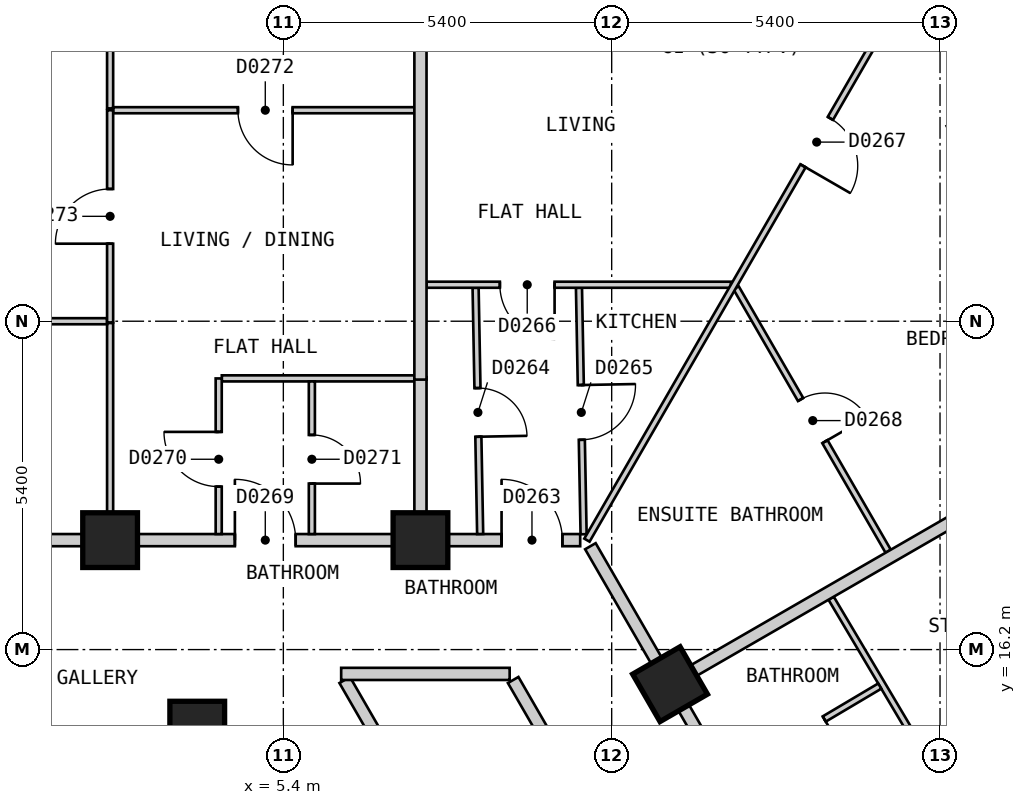
"""IFC4 building model, lengths in metres.
Left out: names, types, materials, properties, quantities, classifications, styles, units other than length and angle.
Written with IfcOpenShell. Run it as: python <this file> out.ifc"""

import sys

from ifc_helpers import new_model, si_unit, direction, frame, frame_2d, origin, origin_2d, place, context, subcontext, project, spatial, polyline, rectangle, outline, extrude, element, fill, save


model = new_model("IFC4")
c1 = context("Model", 3, precision=1e-05, world=origin(), true_north=direction((0.0, 1.0)))
c2 = subcontext(c1, "Body", "Model", "MODEL_VIEW")
j1 = project(units=[si_unit("LENGTHUNIT", "METRE"), si_unit("PLANEANGLEUNIT", "RADIAN")], contexts=[c1])
p1 = place(None, origin())
s1 = spatial("IfcSite", under=j1, at=p1, CompositionType="ELEMENT")
p2 = place(p1, origin())
s2 = spatial("IfcBuilding", under=s1, at=p2, CompositionType="ELEMENT")
p3 = place(p2, frame((0.0, 0.0, 47.4)))
s3 = spatial("IfcBuildingStorey", under=s2, at=p3, CompositionType="ELEMENT", Elevation=47.4)
for number, where, z_axis, x_axis in (
    (1, (11.76, 15.631, 0.0), (0.0, 0.0, 1.0), (-0.5, 0.866, 0.0)),
    (2, (7.655, 18.0, 0.0), (0.0, 0.0, 1.0), (-1.0, 0.0, 0.0)),
    (3, (3.984, 14.9, 0.0), (0.0, 0.0, 1.0), (1.0, 0.0, 0.0)),
    (4, (2.551, 18.0, 0.0), (0.0, 0.0, 1.0), (-1.0, 0.0, 0.0)),
):
    element("IfcColumn", number, at=place(p3, frame(where, z_axis=z_axis, x_axis=x_axis)), inside=s3, PredefinedType="COLUMN", context=c2, shape_type="SweptSolid", body=[
        extrude(rectangle(XDim=0.9, YDim=0.9, at=origin_2d()), origin(), (0.0, 0.0, 1.0), 3.0),
    ])
p4 = place(p3, frame((17.765, 25.77, 0.0), z_axis=(0.0, 0.0, 1.0), x_axis=(-0.866010750942, 0.50002537861, 0.0)))
e5 = element("IfcWall", 5, at=p4, inside=s3, PredefinedType="SOLIDWALL", context=c2, shape_type="SweptSolid", body=[
    extrude(outline(polyline([(0.0, -0.15), (5.0, -0.15), (4.919, 0.15), (0.08, 0.15), (0.0, -0.15)])), origin(), (0.0, 0.0, 1.0), 2.7),
])
p5 = place(p4, frame((0.65, 0.0, 0.15)))
e6 = element("IfcOpeningElement", 6, at=p5, cuts=e5, PredefinedType="OPENING", context=c2, shape_type="SweptSolid", body=[
    extrude(rectangle(XDim=1.2, YDim=2.1, at=frame_2d((0.6, 1.05))), frame((0.0, 0.16, 0.0), z_axis=(0.0, -1.0, 0.0), x_axis=(1.0, 0.0, 0.0)), (0.0, 0.0, 1.0), 0.32),
])
p6 = place(p4, frame((3.15, 0.0, 0.15)))
e7 = element("IfcOpeningElement", 7, at=p6, cuts=e5, PredefinedType="OPENING", context=c2, shape_type="SweptSolid", body=[
    extrude(rectangle(XDim=1.2, YDim=2.1, at=frame_2d((0.6, 1.05))), frame((0.0, 0.16, 0.0), z_axis=(0.0, -1.0, 0.0), x_axis=(1.0, 0.0, 0.0)), (0.0, 0.0, 1.0), 0.32),
])
p7 = place(p3, frame((6.409, 15.7, 0.0), z_axis=(0.0, 0.0, 1.0), x_axis=(0.499930377127, -0.866065596838, 0.0)))
e8 = element("IfcWall", 8, at=p7, inside=s3, PredefinedType="PARTITIONING", context=c2, shape_type="SweptSolid", body=[
    extrude(rectangle(XDim=8.775, YDim=0.2, at=frame_2d((4.388, 0.0))), origin(), (0.0, 0.0, 1.0), 2.7),
])
p8 = place(p3, frame((9.18, 15.7, 0.0), z_axis=(0.0, 0.0, 1.0), x_axis=(0.500003652032, -0.866023295272, 0.0)))
e9 = element("IfcWall", 9, at=p8, inside=s3, PredefinedType="PARTITIONING", context=c2, shape_type="SweptSolid", body=[
    extrude(rectangle(XDim=18.012, YDim=0.2, at=frame_2d((9.006, 0.0))), origin(), (0.0, 0.0, 1.0), 2.7),
])
p9 = place(p8, frame((8.556, 0.0, 0.0)))
e10 = element("IfcOpeningElement", 10, at=p9, cuts=e9, PredefinedType="OPENING", context=c2, shape_type="SweptSolid", body=[
    extrude(rectangle(XDim=0.9, YDim=2.1, at=frame_2d((0.45, 1.05))), frame((0.0, 0.11, 0.0), z_axis=(0.0, -1.0, 0.0), x_axis=(1.0, 0.0, 0.0)), (0.0, 0.0, 1.0), 0.22),
])
p10 = place(p3, frame((10.45, 17.9, 0.0), z_axis=(0.0, 0.0, 1.0), x_axis=(0.500034352617, -0.866005569383, 0.0)))
e11 = element("IfcWall", 11, at=p10, inside=s3, PredefinedType="PARTITIONING", context=c2, shape_type="SweptSolid", body=[
    extrude(rectangle(XDim=20.553, YDim=0.2, at=frame_2d((10.276, 0.0))), origin(), (0.0, 0.0, 1.0), 2.7),
])
p11 = place(p10, frame((14.879, 0.0, 0.0)))
e12 = element("IfcOpeningElement", 12, at=p11, cuts=e11, PredefinedType="OPENING", context=c2, shape_type="SweptSolid", body=[
    extrude(rectangle(XDim=1.0, YDim=2.1, at=frame_2d((0.5, 1.05))), frame((0.0, 0.11, 0.0), z_axis=(0.0, -1.0, 0.0), x_axis=(1.0, 0.0, 0.0)), (0.0, 0.0, 1.0), 0.22),
])
p12 = place(p10, frame((9.775, 0.0, 0.0)))
e13 = element("IfcOpeningElement", 13, at=p12, cuts=e11, PredefinedType="OPENING", context=c2, shape_type="SweptSolid", body=[
    extrude(rectangle(XDim=1.0, YDim=2.1, at=frame_2d((0.5, 1.05))), frame((0.0, 0.11, 0.0), z_axis=(0.0, -1.0, 0.0), x_axis=(1.0, 0.0, 0.0)), (0.0, 0.0, 1.0), 0.22),
])
p13 = place(p10, frame((4.671, 0.0, 0.0)))
e14 = element("IfcOpeningElement", 14, at=p13, cuts=e11, PredefinedType="OPENING", context=c2, shape_type="SweptSolid", body=[
    extrude(rectangle(XDim=1.0, YDim=2.1, at=frame_2d((0.5, 1.05))), frame((0.0, 0.11, 0.0), z_axis=(0.0, -1.0, 0.0), x_axis=(1.0, 0.0, 0.0)), (0.0, 0.0, 1.0), 0.22),
])
p14 = place(p3, frame((6.351, 15.8, 0.0), z_axis=(0.0, 0.0, 1.0), x_axis=(1.0, 0.0, 0.0)))
e15 = element("IfcWall", 15, at=p14, inside=s3, PredefinedType="PARTITIONING", context=c2, shape_type="SweptSolid", body=[
    extrude(rectangle(XDim=2.771, YDim=0.2, at=frame_2d((1.385, 0.0))), origin(), (0.0, 0.0, 1.0), 2.7),
])
p15 = place(p3, frame((-10.276, 18.0, 0.0), z_axis=(0.0, 0.0, 1.0), x_axis=(1.0, 0.0, 0.0)))
e16 = element("IfcWall", 16, at=p15, inside=s3, PredefinedType="PARTITIONING", context=c2, shape_type="SweptSolid", body=[
    extrude(rectangle(XDim=20.558, YDim=0.2, at=frame_2d((10.279, 0.0))), origin(), (0.0, 0.0, 1.0), 2.7),
])
p16 = place(p15, frame((19.265, 0.0, 0.0)))
e17 = element("IfcOpeningElement", 17, at=p16, cuts=e16, PredefinedType="OPENING", context=c2, shape_type="SweptSolid", body=[
    extrude(rectangle(XDim=1.0, YDim=2.1, at=frame_2d((0.5, 1.05))), frame((0.0, 0.11, 0.0), z_axis=(0.0, -1.0, 0.0), x_axis=(1.0, 0.0, 0.0)), (0.0, 0.0, 1.0), 0.22),
])
p17 = place(p15, frame((14.879, 0.0, 0.0)))
e18 = element("IfcOpeningElement", 18, at=p17, cuts=e16, PredefinedType="OPENING", context=c2, shape_type="SweptSolid", body=[
    extrude(rectangle(XDim=1.0, YDim=2.1, at=frame_2d((0.5, 1.05))), frame((0.0, 0.11, 0.0), z_axis=(0.0, -1.0, 0.0), x_axis=(1.0, 0.0, 0.0)), (0.0, 0.0, 1.0), 0.22),
])
p18 = place(p15, frame((4.671, 0.0, 0.0)))
e19 = element("IfcOpeningElement", 19, at=p18, cuts=e16, PredefinedType="OPENING", context=c2, shape_type="SweptSolid", body=[
    extrude(rectangle(XDim=1.0, YDim=2.1, at=frame_2d((0.5, 1.05))), frame((0.0, 0.11, 0.0), z_axis=(0.0, -1.0, 0.0), x_axis=(1.0, 0.0, 0.0)), (0.0, 0.0, 1.0), 0.22),
])
p19 = place(p3, frame((14.409, 17.045, 0.0), z_axis=(0.0, 0.0, 1.0), x_axis=(0.510362209222, -0.859959542884, 0.0)))
e20 = element("IfcWall", 20, at=p19, inside=s3, PredefinedType="PARTITIONING", context=c2, shape_type="SweptSolid", body=[
    extrude(rectangle(XDim=3.131, YDim=0.1, at=frame_2d((1.566, 0.0))), origin(), (0.0, 0.0, 1.0), 2.7),
])
p20 = place(p3, frame((12.846, 22.15, 0.0), z_axis=(0.0, 0.0, 1.0), x_axis=(0.500002715276, -0.866023836113, 0.0)))
e21 = element("IfcWall", 21, at=p20, inside=s3, PredefinedType="PARTITIONING", context=c2, shape_type="SweptSolid", body=[
    extrude(rectangle(XDim=5.002, YDim=0.1, at=frame_2d((2.501, 0.0))), origin(), (0.0, 0.0, 1.0), 2.7),
])
p21 = place(p20, frame((2.122, 0.0, 0.0)))
e22 = element("IfcOpeningElement", 22, at=p21, cuts=e21, PredefinedType="OPENING", context=c2, shape_type="SweptSolid", body=[
    extrude(rectangle(XDim=0.8, YDim=2.1, at=frame_2d((0.4, 1.05))), frame((0.0, 0.06, 0.0), z_axis=(0.0, -1.0, 0.0), x_axis=(1.0, 0.0, 0.0)), (0.0, 0.0, 1.0), 0.12),
])
p22 = place(p3, frame((8.562, 22.15, 0.0), z_axis=(0.0, 0.0, 1.0), x_axis=(0.018504185939, -0.999828782894, 0.0)))
e23 = element("IfcWall", 23, at=p22, inside=s3, PredefinedType="PARTITIONING", context=c2, shape_type="SweptSolid", body=[
    extrude(rectangle(XDim=4.051, YDim=0.1, at=frame_2d((2.025, 0.0))), origin(), (0.0, 0.0, 1.0), 2.7),
])
p23 = place(p22, frame((1.65, 0.0, 0.0)))
e24 = element("IfcOpeningElement", 24, at=p23, cuts=e23, PredefinedType="OPENING", context=c2, shape_type="SweptSolid", body=[
    extrude(rectangle(XDim=0.8, YDim=2.1, at=frame_2d((0.4, 1.05))), frame((0.0, 0.06, 0.0), z_axis=(0.0, -1.0, 0.0), x_axis=(1.0, 0.0, 0.0)), (0.0, 0.0, 1.0), 0.12),
])
p24 = place(p3, frame((10.262, 22.15, 0.0), z_axis=(0.0, 0.0, 1.0), x_axis=(0.018730524712, -0.999824568334, 0.0)))
e25 = element("IfcWall", 25, at=p24, inside=s3, PredefinedType="PARTITIONING", context=c2, shape_type="SweptSolid", body=[
    extrude(rectangle(XDim=4.054, YDim=0.1, at=frame_2d((2.027, 0.0))), origin(), (0.0, 0.0, 1.0), 2.7),
])
p25 = place(p24, frame((1.6, 0.0, 0.0)))
e26 = element("IfcOpeningElement", 26, at=p25, cuts=e25, PredefinedType="OPENING", context=c2, shape_type="SweptSolid", body=[
    extrude(rectangle(XDim=0.9, YDim=2.1, at=frame_2d((0.45, 1.05))), frame((0.0, 0.06, 0.0), z_axis=(0.0, -1.0, 0.0), x_axis=(1.0, 0.0, 0.0)), (0.0, 0.0, 1.0), 0.12),
])
p26 = place(p3, frame((2.551, 28.1, 0.0), z_axis=(0.0, 0.0, 1.0), x_axis=(0.0, -1.0, 0.0)))
e27 = element("IfcWall", 27, at=p26, inside=s3, PredefinedType="PARTITIONING", context=c2, shape_type="SweptSolid", body=[
    extrude(rectangle(XDim=3.0, YDim=0.1, at=frame_2d((1.5, 0.0))), origin(), (0.0, 0.0, 1.0), 2.7),
])
p27 = place(p3, frame((2.551, 21.57, 0.0), z_axis=(0.0, 0.0, 1.0), x_axis=(0.0, -1.0, 0.0)))
e28 = element("IfcWall", 28, at=p27, inside=s3, PredefinedType="PARTITIONING", context=c2, shape_type="SweptSolid", body=[
    extrude(rectangle(XDim=3.47, YDim=0.1, at=frame_2d((1.735, 0.0))), origin(), (0.0, 0.0, 1.0), 2.7),
])
p28 = place(p3, frame((4.388, 20.66, 0.0), z_axis=(0.0, 0.0, 1.0), x_axis=(1.0, 0.0, 0.0)))
e29 = element("IfcWall", 29, at=p28, inside=s3, PredefinedType="PARTITIONING", context=c2, shape_type="SweptSolid", body=[
    extrude(rectangle(XDim=3.167, YDim=0.1, at=frame_2d((1.583, 0.0))), origin(), (0.0, 0.0, 1.0), 2.7),
])
p29 = place(p3, frame((-2.453, 21.6, 0.0), z_axis=(0.0, 0.0, 1.0), x_axis=(1.0, 0.0, 0.0)))
e30 = element("IfcWall", 30, at=p29, inside=s3, PredefinedType="PARTITIONING", context=c2, shape_type="SweptSolid", body=[
    extrude(rectangle(XDim=4.954, YDim=0.1, at=frame_2d((2.477, 0.0))), origin(), (0.0, 0.0, 1.0), 2.7),
])
p30 = place(p29, frame((2.052, 0.0, 0.0)))
e31 = element("IfcOpeningElement", 31, at=p30, cuts=e30, PredefinedType="OPENING", context=c2, shape_type="SweptSolid", body=[
    extrude(rectangle(XDim=0.8, YDim=2.1, at=frame_2d((0.4, 1.05))), frame((0.0, 0.06, 0.0), z_axis=(0.0, -1.0, 0.0), x_axis=(1.0, 0.0, 0.0)), (0.0, 0.0, 1.0), 0.12),
])
p31 = place(p3, frame((7.755, 22.2, 0.0), z_axis=(0.0, 0.0, 1.0), x_axis=(1.0, 0.0, 0.0)))
e32 = element("IfcWall", 32, at=p31, inside=s3, PredefinedType="PARTITIONING", context=c2, shape_type="SweptSolid", body=[
    extrude(rectangle(XDim=5.005, YDim=0.1, at=frame_2d((2.502, 0.0))), origin(), (0.0, 0.0, 1.0), 2.7),
])
p32 = place(p31, frame((1.206, 0.0, 0.0)))
e33 = element("IfcOpeningElement", 33, at=p32, cuts=e32, PredefinedType="OPENING", context=c2, shape_type="SweptSolid", body=[
    extrude(rectangle(XDim=0.9, YDim=2.1, at=frame_2d((0.45, 1.05))), frame((0.0, 0.06, 0.0), z_axis=(0.0, -1.0, 0.0), x_axis=(1.0, 0.0, 0.0)), (0.0, 0.0, 1.0), 0.12),
])
p33 = place(p3, frame((2.601, 25.07, 0.0), z_axis=(0.0, 0.0, 1.0), x_axis=(1.0, 0.0, 0.0)))
e34 = element("IfcWall", 34, at=p33, inside=s3, PredefinedType="PARTITIONING", context=c2, shape_type="SweptSolid", body=[
    extrude(rectangle(XDim=4.954, YDim=0.1, at=frame_2d((2.477, 0.0))), origin(), (0.0, 0.0, 1.0), 2.7),
])
p34 = place(p33, frame((2.052, 0.0, 0.0)))
e35 = element("IfcOpeningElement", 35, at=p34, cuts=e34, PredefinedType="OPENING", context=c2, shape_type="SweptSolid", body=[
    extrude(rectangle(XDim=0.9, YDim=2.1, at=frame_2d((0.45, 1.05))), frame((0.0, 0.06, 0.0), z_axis=(0.0, -1.0, 0.0), x_axis=(1.0, 0.0, 0.0)), (0.0, 0.0, 1.0), 0.12),
])
p35 = place(p3, frame((10.393, 18.0, 0.0), z_axis=(0.0, 0.0, 1.0), x_axis=(0.499945497007, 0.866056868816, 0.0)))
e36 = element("IfcWall", 36, at=p35, inside=s3, PredefinedType="PARTITIONING", context=c2, shape_type="SweptSolid", body=[
    extrude(rectangle(XDim=10.265, YDim=0.1, at=frame_2d((5.132, 0.0))), origin(), (0.0, 0.0, 1.0), 2.7),
])
p36 = place(p35, frame((7.108, 0.0, 0.0)))
e37 = element("IfcOpeningElement", 37, at=p36, cuts=e36, PredefinedType="OPENING", context=c2, shape_type="SweptSolid", body=[
    extrude(rectangle(XDim=0.9, YDim=2.1, at=frame_2d((0.45, 1.05))), frame((0.0, 0.06, 0.0), z_axis=(0.0, -1.0, 0.0), x_axis=(1.0, 0.0, 0.0)), (0.0, 0.0, 1.0), 0.12),
])
p37 = place(p3, frame((4.337, 18.1, 0.0), z_axis=(0.0, 0.0, 1.0), x_axis=(0.0, 1.0, 0.0)))
e38 = element("IfcWall", 38, at=p37, inside=s3, PredefinedType="PARTITIONING", context=c2, shape_type="SweptSolid", body=[
    extrude(rectangle(XDim=2.559, YDim=0.1, at=frame_2d((1.279, 0.0))), origin(), (0.0, 0.0, 1.0), 2.7),
])
p38 = place(p37, frame((0.78, 0.0, 0.0)))
e39 = element("IfcOpeningElement", 39, at=p38, cuts=e38, PredefinedType="OPENING", context=c2, shape_type="SweptSolid", body=[
    extrude(rectangle(XDim=0.9, YDim=2.1, at=frame_2d((0.45, 1.05))), frame((0.0, 0.06, 0.0), z_axis=(0.0, -1.0, 0.0), x_axis=(1.0, 0.0, 0.0)), (0.0, 0.0, 1.0), 0.12),
])
p39 = place(p3, frame((5.869, 18.1, 0.0), z_axis=(0.0, 0.0, 1.0), x_axis=(0.0, 1.0, 0.0)))
e40 = element("IfcWall", 40, at=p39, inside=s3, PredefinedType="PARTITIONING", context=c2, shape_type="SweptSolid", body=[
    extrude(rectangle(XDim=2.51, YDim=0.1, at=frame_2d((1.255, 0.0))), origin(), (0.0, 0.0, 1.0), 2.7),
])
p40 = place(p39, frame((0.83, 0.0, 0.0)))
e41 = element("IfcOpeningElement", 41, at=p40, cuts=e40, PredefinedType="OPENING", context=c2, shape_type="SweptSolid", body=[
    extrude(rectangle(XDim=0.8, YDim=2.1, at=frame_2d((0.4, 1.05))), frame((0.0, 0.06, 0.0), z_axis=(0.0, -1.0, 0.0), x_axis=(1.0, 0.0, 0.0)), (0.0, 0.0, 1.0), 0.12),
])
p41 = place(p3, frame((2.551, 21.58, 0.0), z_axis=(0.0, 0.0, 1.0), x_axis=(0.0, 1.0, 0.0)))
e42 = element("IfcWall", 42, at=p41, inside=s3, PredefinedType="PARTITIONING", context=c2, shape_type="SweptSolid", body=[
    extrude(rectangle(XDim=3.49, YDim=0.1, at=frame_2d((1.745, 0.0))), origin(), (0.0, 0.0, 1.0), 2.7),
])
p42 = place(p41, frame((1.295, 0.0, 0.0)))
e43 = element("IfcOpeningElement", 43, at=p42, cuts=e42, PredefinedType="OPENING", context=c2, shape_type="SweptSolid", body=[
    extrude(rectangle(XDim=0.9, YDim=2.1, at=frame_2d((0.45, 1.05))), frame((0.0, 0.06, 0.0), z_axis=(0.0, -1.0, 0.0), x_axis=(1.0, 0.0, 0.0)), (0.0, 0.0, 1.0), 0.12),
])
p43 = place(p3, frame((12.739, 14.135, 0.0), z_axis=(0.0, 0.0, 1.0), x_axis=(0.860077414703, 0.510163543109, 0.0)))
e44 = element("IfcWall", 44, at=p43, inside=s3, PredefinedType="PARTITIONING", context=c2, shape_type="SweptSolid", body=[
    extrude(rectangle(XDim=2.872, YDim=0.1, at=frame_2d((1.436, 0.0))), origin(), (0.0, 0.0, 1.0), 2.7),
])
p44 = place(p43, frame((1.01, 0.0, 0.0)))
e45 = element("IfcOpeningElement", 45, at=p44, cuts=e44, PredefinedType="OPENING", context=c2, shape_type="SweptSolid", body=[
    extrude(rectangle(XDim=0.8, YDim=2.1, at=frame_2d((0.4, 1.05))), frame((0.0, 0.06, 0.0), z_axis=(0.0, -1.0, 0.0), x_axis=(1.0, 0.0, 0.0)), (0.0, 0.0, 1.0), 0.12),
])
p45 = place(p3, frame((7.655, 20.68, 0.0), z_axis=(0.0, 0.0, 1.0), x_axis=(0.0, -1.0, 0.0)))
e46 = element("IfcWall", 46, at=p45, inside=s3, PredefinedType="PARTITIONING", context=c2, shape_type="SweptSolid", body=[
    extrude(rectangle(XDim=2.58, YDim=0.2, at=frame_2d((1.29, 0.0))), origin(), (0.0, 0.0, 1.0), 2.7),
])
p46 = place(p3, frame((7.655, 20.64, 0.0), z_axis=(0.0, 0.0, 1.0), x_axis=(0.0, 1.0, 0.0)))
e47 = element("IfcWall", 47, at=p46, inside=s3, PredefinedType="PARTITIONING", context=c2, shape_type="SweptSolid", body=[
    extrude(rectangle(XDim=7.46, YDim=0.2, at=frame_2d((3.73, 0.0))), origin(), (0.0, 0.0, 1.0), 2.7),
])
for number, where, z_axis, x_axis in (
    (48, (11.847, 15.681, 0.0), (0.0, 0.0, 1.0), (0.866, 0.5, 0.0)),
    (49, (14.399, 11.261, 0.0), (0.0, 0.0, 1.0), (0.866, 0.5, 0.0)),
):
    element("IfcWall", number, at=place(p3, frame(where, z_axis=z_axis, x_axis=x_axis)), inside=s3, PredefinedType="PARTITIONING", context=c2, shape_type="SweptSolid", body=[
        extrude(rectangle(XDim=10.0, YDim=0.2, at=frame_2d((5.0, 0.0))), origin(), (0.0, 0.0, 1.0), 2.7),
    ])
p47 = place(p44, origin())
e50 = element("IfcDoor", 50, at=p47, inside=s3, OperationType="SINGLE_SWING_RIGHT", PredefinedType="DOOR", context=c2, shape_type="SweptSolid", body=[
    extrude(rectangle(XDim=0.8, YDim=2.1, at=frame_2d((0.4, 1.05))), frame((0.0, 0.025, 0.0), z_axis=(0.0, -1.0, 0.0), x_axis=(1.0, 0.0, 0.0)), (0.0, 0.0, 1.0), 0.05),
])
fill(e45, e50)
p48 = place(p16, origin())
e51 = element("IfcDoor", 51, at=p48, inside=s3, OperationType="SINGLE_SWING_LEFT", PredefinedType="DOOR", context=c2, shape_type="SweptSolid", body=[
    extrude(rectangle(XDim=1.0, YDim=2.1, at=frame_2d((0.5, 1.05))), frame((0.0, 0.025, 0.0), z_axis=(0.0, -1.0, 0.0), x_axis=(1.0, 0.0, 0.0)), (0.0, 0.0, 1.0), 0.05),
])
fill(e17, e51)
p49 = place(p23, origin())
e52 = element("IfcDoor", 52, at=p49, inside=s3, OperationType="SINGLE_SWING_RIGHT", PredefinedType="DOOR", context=c2, shape_type="SweptSolid", body=[
    extrude(rectangle(XDim=0.8, YDim=2.1, at=frame_2d((0.4, 1.05))), frame((0.0, 0.025, 0.0), z_axis=(0.0, -1.0, 0.0), x_axis=(1.0, 0.0, 0.0)), (0.0, 0.0, 1.0), 0.05),
])
fill(e24, e52)
p50 = place(p25, origin())
e53 = element("IfcDoor", 53, at=p50, inside=s3, OperationType="SINGLE_SWING_LEFT", PredefinedType="DOOR", context=c2, shape_type="SweptSolid", body=[
    extrude(rectangle(XDim=0.9, YDim=2.1, at=frame_2d((0.45, 1.05))), frame((0.0, 0.025, 0.0), z_axis=(0.0, -1.0, 0.0), x_axis=(1.0, 0.0, 0.0)), (0.0, 0.0, 1.0), 0.05),
])
fill(e26, e53)
p51 = place(p32, origin())
e54 = element("IfcDoor", 54, at=p51, inside=s3, OperationType="SINGLE_SWING_RIGHT", PredefinedType="DOOR", context=c2, shape_type="SweptSolid", body=[
    extrude(rectangle(XDim=0.9, YDim=2.1, at=frame_2d((0.45, 1.05))), frame((0.0, 0.025, 0.0), z_axis=(0.0, -1.0, 0.0), x_axis=(1.0, 0.0, 0.0)), (0.0, 0.0, 1.0), 0.05),
])
fill(e33, e54)
p52 = place(p36, origin())
e55 = element("IfcDoor", 55, at=p52, inside=s3, OperationType="SINGLE_SWING_LEFT", PredefinedType="DOOR", context=c2, shape_type="SweptSolid", body=[
    extrude(rectangle(XDim=0.9, YDim=2.1, at=frame_2d((0.45, 1.05))), frame((0.0, 0.025, 0.0), z_axis=(0.0, -1.0, 0.0), x_axis=(1.0, 0.0, 0.0)), (0.0, 0.0, 1.0), 0.05),
])
fill(e37, e55)
p53 = place(p21, origin())
e56 = element("IfcDoor", 56, at=p53, inside=s3, OperationType="SINGLE_SWING_RIGHT", PredefinedType="DOOR", context=c2, shape_type="SweptSolid", body=[
    extrude(rectangle(XDim=0.8, YDim=2.1, at=frame_2d((0.4, 1.05))), frame((0.0, 0.025, 0.0), z_axis=(0.0, -1.0, 0.0), x_axis=(1.0, 0.0, 0.0)), (0.0, 0.0, 1.0), 0.05),
])
fill(e22, e56)
p54 = place(p17, origin())
e57 = element("IfcDoor", 57, at=p54, inside=s3, OperationType="SINGLE_SWING_LEFT", PredefinedType="DOOR", context=c2, shape_type="SweptSolid", body=[
    extrude(rectangle(XDim=1.0, YDim=2.1, at=frame_2d((0.5, 1.05))), frame((0.0, 0.025, 0.0), z_axis=(0.0, -1.0, 0.0), x_axis=(1.0, 0.0, 0.0)), (0.0, 0.0, 1.0), 0.05),
])
fill(e18, e57)
p55 = place(p38, origin())
e58 = element("IfcDoor", 58, at=p55, inside=s3, OperationType="SINGLE_SWING_RIGHT", PredefinedType="DOOR", context=c2, shape_type="SweptSolid", body=[
    extrude(rectangle(XDim=0.9, YDim=2.1, at=frame_2d((0.45, 1.05))), frame((0.0, 0.025, 0.0), z_axis=(0.0, -1.0, 0.0), x_axis=(1.0, 0.0, 0.0)), (0.0, 0.0, 1.0), 0.05),
])
fill(e39, e58)
p56 = place(p40, origin())
e59 = element("IfcDoor", 59, at=p56, inside=s3, OperationType="SINGLE_SWING_LEFT", PredefinedType="DOOR", context=c2, shape_type="SweptSolid", body=[
    extrude(rectangle(XDim=0.8, YDim=2.1, at=frame_2d((0.4, 1.05))), frame((0.0, 0.025, 0.0), z_axis=(0.0, -1.0, 0.0), x_axis=(1.0, 0.0, 0.0)), (0.0, 0.0, 1.0), 0.05),
])
fill(e41, e59)
p57 = place(p34, origin())
e60 = element("IfcDoor", 60, at=p57, inside=s3, OperationType="SINGLE_SWING_RIGHT", PredefinedType="DOOR", context=c2, shape_type="SweptSolid", body=[
    extrude(rectangle(XDim=0.9, YDim=2.1, at=frame_2d((0.45, 1.05))), frame((0.0, 0.025, 0.0), z_axis=(0.0, -1.0, 0.0), x_axis=(1.0, 0.0, 0.0)), (0.0, 0.0, 1.0), 0.05),
])
fill(e35, e60)
p58 = place(p42, origin())
e61 = element("IfcDoor", 61, at=p58, inside=s3, OperationType="SINGLE_SWING_LEFT", PredefinedType="DOOR", context=c2, shape_type="SweptSolid", body=[
    extrude(rectangle(XDim=0.9, YDim=2.1, at=frame_2d((0.45, 1.05))), frame((0.0, 0.025, 0.0), z_axis=(0.0, -1.0, 0.0), x_axis=(1.0, 0.0, 0.0)), (0.0, 0.0, 1.0), 0.05),
])
fill(e43, e61)
save(model, sys.argv[1])
